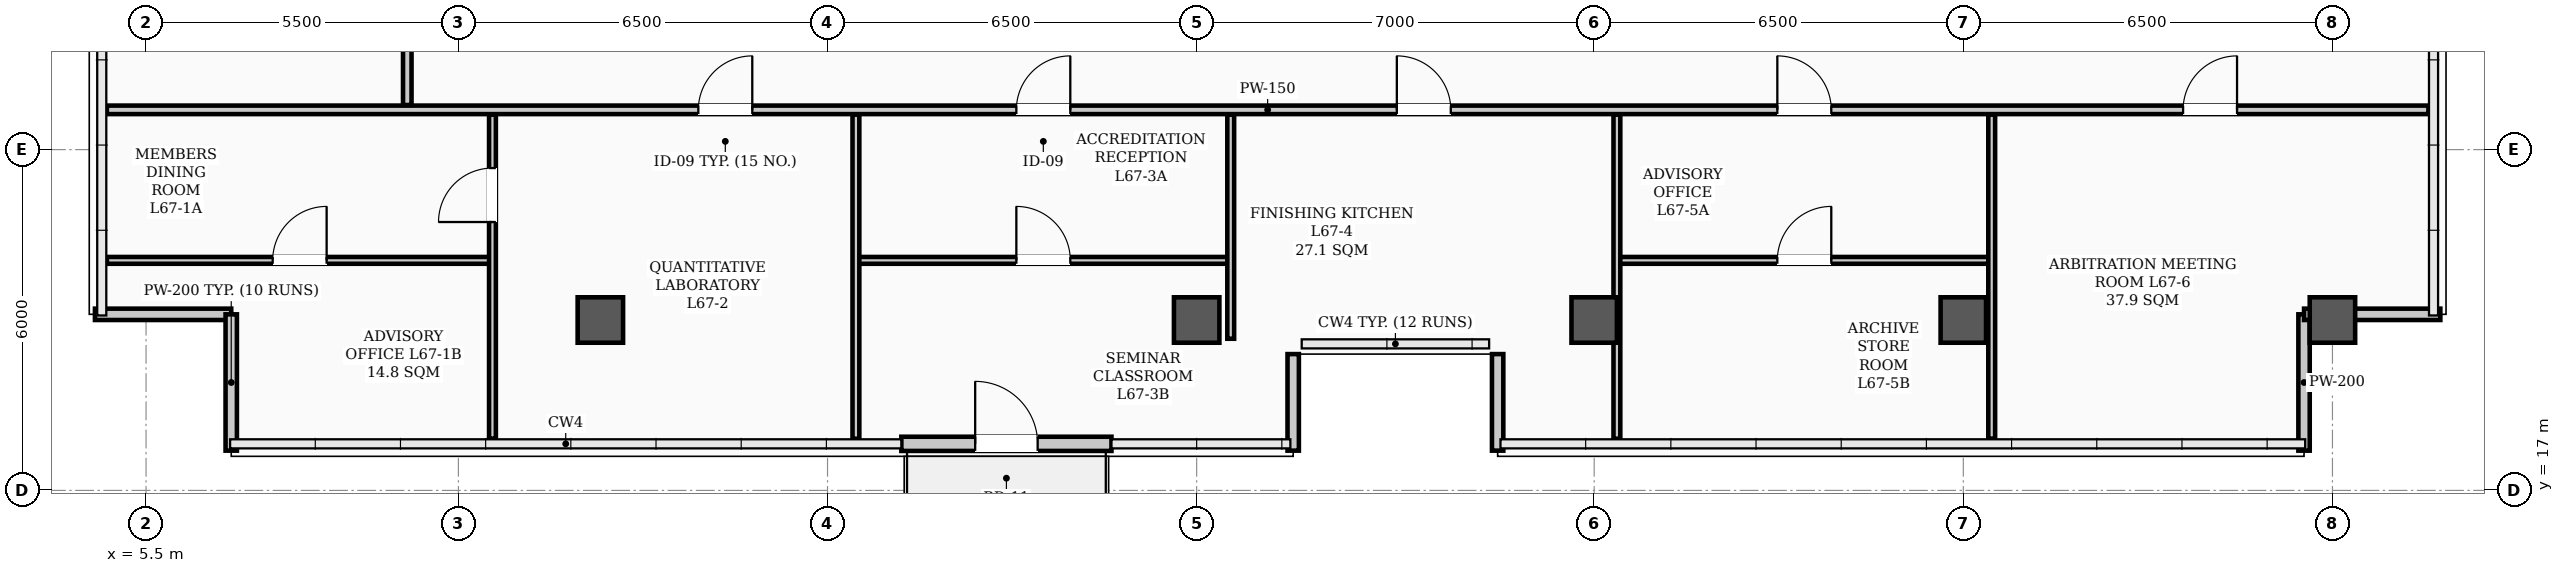
"""IFC4 building model, lengths in metres.
Left out: names, types, materials, properties, quantities, classifications, styles, units other than length and angle.
Written with IfcOpenShell. Run it as: python <this file> out.ifc"""

import sys

from ifc_helpers import new_model, si_unit, direction, frame, frame_2d, origin, origin_2d, place, context, subcontext, project, spatial, rectangle, hollow_rectangle, extrude, element, fill, save


model = new_model("IFC4")
c1 = context("Model", 3, precision=1e-05, world=origin(), true_north=direction((0.0, 1.0)))
c2 = subcontext(c1, "Body", "Model", "MODEL_VIEW")
j1 = project(units=[si_unit("LENGTHUNIT", "METRE"), si_unit("PLANEANGLEUNIT", "RADIAN")], contexts=[c1])
p1 = place(None, origin())
s1 = spatial("IfcSite", under=j1, at=p1, CompositionType="ELEMENT")
p2 = place(p1, origin())
s2 = spatial("IfcBuilding", under=s1, at=p2, CompositionType="ELEMENT")
p3 = place(p2, frame((0.0, 0.0, 269.6)))
s3 = spatial("IfcBuildingStorey", under=s2, at=p3, CompositionType="ELEMENT", Elevation=269.6)
for number, where, z_axis, x_axis in (
    (1, (13.5, 20.0, 0.0), (0.0, 0.0, 1.0), (1.0, 0.0, 0.0)),
    (2, (24.0, 20.0, 0.0), (0.0, 0.0, 1.0), (1.0, 0.0, 0.0)),
    (3, (31.0, 20.0, 0.0), (0.0, 0.0, 1.0), (1.0, 0.0, 0.0)),
    (4, (37.5, 20.0, 0.0), (0.0, 0.0, 1.0), (1.0, 0.0, 0.0)),
    (5, (44.0, 20.0, 0.0), (0.0, 0.0, 1.0), (1.0, 0.0, 0.0)),
):
    element("IfcColumn", number, at=place(p3, frame(where, z_axis=z_axis, x_axis=x_axis)), inside=s3, PredefinedType="COLUMN", context=c2, shape_type="SweptSolid", body=[
        extrude(hollow_rectangle(XDim=0.8, YDim=0.8, WallThickness=0.032, InnerFilletRadius=0.016, OuterFilletRadius=0.048, at=origin_2d()), origin(), (0.0, 0.0, 1.0), 3.9),
    ])
p4 = place(p3, frame((4.6, 20.1, 0.0), z_axis=(0.0, 0.0, 1.0), x_axis=(1.0, 0.0, 0.0)))
e6 = element("IfcWall", 6, at=p4, inside=s3, PredefinedType="PARAPET", context=c2, shape_type="SweptSolid", body=[
    extrude(rectangle(XDim=2.4, YDim=0.2, at=frame_2d((1.2, 0.0))), origin(), (0.0, 0.0, 1.0), 1.2),
])
for number, where, z_axis, x_axis in (
    (7, (7.0, 20.1, 0.0), (0.0, 0.0, 1.0), (0.0, -1.0, 0.0)),
    (8, (43.5, 17.7, 0.0), (0.0, 0.0, 1.0), (0.0, 1.0, 0.0)),
):
    element("IfcWall", number, at=place(p3, frame(where, z_axis=z_axis, x_axis=x_axis)), inside=s3, PredefinedType="PARAPET", context=c2, shape_type="SweptSolid", body=[
        extrude(rectangle(XDim=2.4, YDim=0.2, at=frame_2d((1.2, 0.0))), origin(), (0.0, 0.0, 1.0), 1.2),
    ])
p5 = place(p3, frame((43.5, 20.1, 0.0), z_axis=(0.0, 0.0, 1.0), x_axis=(1.0, 0.0, 0.0)))
e9 = element("IfcWall", 9, at=p5, inside=s3, PredefinedType="PARAPET", context=c2, shape_type="SweptSolid", body=[
    extrude(rectangle(XDim=2.4, YDim=0.2, at=frame_2d((1.2, 0.0))), origin(), (0.0, 0.0, 1.0), 1.2),
])
for number, where, z_axis, x_axis in (
    (10, (25.7, 17.7, 0.0), (0.0, 0.0, 1.0), (0.0, 1.0, 0.0)),
    (11, (29.3, 19.4, 0.0), (0.0, 0.0, 1.0), (0.0, -1.0, 0.0)),
):
    element("IfcWall", number, at=place(p3, frame(where, z_axis=z_axis, x_axis=x_axis)), inside=s3, PredefinedType="PARAPET", context=c2, shape_type="SweptSolid", body=[
        extrude(rectangle(XDim=1.7, YDim=0.2, at=frame_2d((0.85, 0.0))), origin(), (0.0, 0.0, 1.0), 1.2),
    ])
p6 = place(p3, frame((18.8, 17.82, 0.0), z_axis=(0.0, 0.0, 1.0), x_axis=(1.0, 0.0, 0.0)))
e12 = element("IfcWall", 12, at=p6, inside=s3, PredefinedType="STANDARD", context=c2, shape_type="SweptSolid", body=[
    extrude(rectangle(XDim=3.7, YDim=0.25, at=frame_2d((1.85, 0.0))), origin(), (0.0, 0.0, 1.0), 3.18),
])
p7 = place(p6, frame((1.3, 0.0, 0.0)))
e13 = element("IfcOpeningElement", 13, at=p7, cuts=e12, PredefinedType="OPENING", context=c2, shape_type="SweptSolid", body=[
    extrude(rectangle(XDim=1.1, YDim=2.2, at=frame_2d((0.55, 1.1))), frame((0.0, 0.135, 0.0), z_axis=(0.0, -1.0, 0.0), x_axis=(1.0, 0.0, 0.0)), (0.0, 0.0, 1.0), 0.27),
])
p8 = place(p3, frame((4.81, 23.7, 0.0), z_axis=(0.0, 0.0, 1.0), x_axis=(1.0, 0.0, 0.0)))
e14 = element("IfcWall", 14, at=p8, inside=s3, PredefinedType="PARTITIONING", context=c2, shape_type="SweptSolid", body=[
    extrude(rectangle(XDim=40.88, YDim=0.15, at=frame_2d((20.44, 0.0))), origin(), (0.0, 0.0, 1.0), 3.2),
])
p9 = place(p8, frame((10.415, 0.0, 0.0)))
e15 = element("IfcOpeningElement", 15, at=p9, cuts=e14, PredefinedType="OPENING", context=c2, shape_type="SweptSolid", body=[
    extrude(rectangle(XDim=0.95, YDim=2.08, at=frame_2d((0.475, 1.04))), frame((0.0, 0.085, 0.0), z_axis=(0.0, -1.0, 0.0), x_axis=(1.0, 0.0, 0.0)), (0.0, 0.0, 1.0), 0.17),
])
p10 = place(p8, frame((16.015, 0.0, 0.0)))
e16 = element("IfcOpeningElement", 16, at=p10, cuts=e14, PredefinedType="OPENING", context=c2, shape_type="SweptSolid", body=[
    extrude(rectangle(XDim=0.95, YDim=2.08, at=frame_2d((0.475, 1.04))), frame((0.0, 0.085, 0.0), z_axis=(0.0, -1.0, 0.0), x_axis=(1.0, 0.0, 0.0)), (0.0, 0.0, 1.0), 0.17),
])
p11 = place(p8, frame((22.715, 0.0, 0.0)))
e17 = element("IfcOpeningElement", 17, at=p11, cuts=e14, PredefinedType="OPENING", context=c2, shape_type="SweptSolid", body=[
    extrude(rectangle(XDim=0.95, YDim=2.08, at=frame_2d((0.475, 1.04))), frame((0.0, 0.085, 0.0), z_axis=(0.0, -1.0, 0.0), x_axis=(1.0, 0.0, 0.0)), (0.0, 0.0, 1.0), 0.17),
])
p12 = place(p8, frame((29.415, 0.0, 0.0)))
e18 = element("IfcOpeningElement", 18, at=p12, cuts=e14, PredefinedType="OPENING", context=c2, shape_type="SweptSolid", body=[
    extrude(rectangle(XDim=0.95, YDim=2.08, at=frame_2d((0.475, 1.04))), frame((0.0, 0.085, 0.0), z_axis=(0.0, -1.0, 0.0), x_axis=(1.0, 0.0, 0.0)), (0.0, 0.0, 1.0), 0.17),
])
p13 = place(p8, frame((36.56, 0.0, 0.0)))
e19 = element("IfcOpeningElement", 19, at=p13, cuts=e14, PredefinedType="OPENING", context=c2, shape_type="SweptSolid", body=[
    extrude(rectangle(XDim=0.95, YDim=2.08, at=frame_2d((0.475, 1.04))), frame((0.0, 0.085, 0.0), z_axis=(0.0, -1.0, 0.0), x_axis=(1.0, 0.0, 0.0)), (0.0, 0.0, 1.0), 0.17),
])
p14 = place(p3, frame((4.81, 21.05, 0.0), z_axis=(0.0, 0.0, 1.0), x_axis=(1.0, 0.0, 0.0)))
e20 = element("IfcWall", 20, at=p14, inside=s3, PredefinedType="PARTITIONING", context=c2, shape_type="SweptSolid", body=[
    extrude(rectangle(XDim=6.79, YDim=0.12, at=frame_2d((3.395, 0.0))), origin(), (0.0, 0.0, 1.0), 3.72),
])
p15 = place(p14, frame((2.92, 0.0, 0.0)))
e21 = element("IfcOpeningElement", 21, at=p15, cuts=e20, PredefinedType="OPENING", context=c2, shape_type="SweptSolid", body=[
    extrude(rectangle(XDim=0.95, YDim=2.08, at=frame_2d((0.475, 1.04))), frame((0.0, 0.07, 0.0), z_axis=(0.0, -1.0, 0.0), x_axis=(1.0, 0.0, 0.0)), (0.0, 0.0, 1.0), 0.14),
])
p16 = place(p3, frame((18.0, 21.05, 0.0), z_axis=(0.0, 0.0, 1.0), x_axis=(1.0, 0.0, 0.0)))
e22 = element("IfcWall", 22, at=p16, inside=s3, PredefinedType="PARTITIONING", context=c2, shape_type="SweptSolid", body=[
    extrude(rectangle(XDim=6.6, YDim=0.12, at=frame_2d((3.3, 0.0))), origin(), (0.0, 0.0, 1.0), 3.2),
])
p17 = place(p16, frame((2.825, 0.0, 0.0)))
e23 = element("IfcOpeningElement", 23, at=p17, cuts=e22, PredefinedType="OPENING", context=c2, shape_type="SweptSolid", body=[
    extrude(rectangle(XDim=0.95, YDim=2.08, at=frame_2d((0.475, 1.04))), frame((0.0, 0.07, 0.0), z_axis=(0.0, -1.0, 0.0), x_axis=(1.0, 0.0, 0.0)), (0.0, 0.0, 1.0), 0.14),
])
p18 = place(p3, frame((31.4, 21.05, 0.0), z_axis=(0.0, 0.0, 1.0), x_axis=(1.0, 0.0, 0.0)))
e24 = element("IfcWall", 24, at=p18, inside=s3, PredefinedType="PARTITIONING", context=c2, shape_type="SweptSolid", body=[
    extrude(rectangle(XDim=6.6, YDim=0.12, at=frame_2d((3.3, 0.0))), origin(), (0.0, 0.0, 1.0), 3.2),
])
p19 = place(p18, frame((2.825, 0.0, 0.0)))
e25 = element("IfcOpeningElement", 25, at=p19, cuts=e24, PredefinedType="OPENING", context=c2, shape_type="SweptSolid", body=[
    extrude(rectangle(XDim=0.95, YDim=2.08, at=frame_2d((0.475, 1.04))), frame((0.0, 0.07, 0.0), z_axis=(0.0, -1.0, 0.0), x_axis=(1.0, 0.0, 0.0)), (0.0, 0.0, 1.0), 0.14),
])
p20 = place(p3, frame((10.1, 23.785, 0.0), z_axis=(0.0, 0.0, 1.0), x_axis=(0.0, 1.0, 0.0)))
e26 = element("IfcWall", 26, at=p20, inside=s3, PredefinedType="PARTITIONING", context=c2, shape_type="SweptSolid", body=[
    extrude(rectangle(XDim=17.88, YDim=0.15, at=frame_2d((8.94, 0.0))), origin(), (0.0, 0.0, 1.0), 3.1),
])
p21 = place(p20, frame((8.465, 0.0, 0.0)))
e27 = element("IfcOpeningElement", 27, at=p21, cuts=e26, PredefinedType="OPENING", context=c2, shape_type="SweptSolid", body=[
    extrude(rectangle(XDim=0.95, YDim=2.08, at=frame_2d((0.475, 1.04))), frame((0.0, 0.085, 0.0), z_axis=(0.0, -1.0, 0.0), x_axis=(1.0, 0.0, 0.0)), (0.0, 0.0, 1.0), 0.17),
])
p22 = place(p3, frame((11.6, 17.91, 0.0), z_axis=(0.0, 0.0, 1.0), x_axis=(0.0, 1.0, 0.0)))
e28 = element("IfcWall", 28, at=p22, inside=s3, PredefinedType="PARTITIONING", context=c2, shape_type="SweptSolid", body=[
    extrude(rectangle(XDim=5.705, YDim=0.12, at=frame_2d((2.853, 0.0))), origin(), (0.0, 0.0, 1.0), 3.72),
])
p23 = place(p22, frame((3.815, 0.0, 0.0)))
e29 = element("IfcOpeningElement", 29, at=p23, cuts=e28, PredefinedType="OPENING", context=c2, shape_type="SweptSolid", body=[
    extrude(rectangle(XDim=0.95, YDim=2.08, at=frame_2d((0.475, 1.04))), frame((0.0, 0.07, 0.0), z_axis=(0.0, -1.0, 0.0), x_axis=(1.0, 0.0, 0.0)), (0.0, 0.0, 1.0), 0.14),
])
p24 = place(p3, frame((18.0, 17.91, 0.0), z_axis=(0.0, 0.0, 1.0), x_axis=(0.0, 1.0, 0.0)))
e30 = element("IfcWall", 30, at=p24, inside=s3, PredefinedType="PARTITIONING", context=c2, shape_type="SweptSolid", body=[
    extrude(rectangle(XDim=5.705, YDim=0.12, at=frame_2d((2.853, 0.0))), origin(), (0.0, 0.0, 1.0), 3.1),
])
p25 = place(p3, frame((24.6, 19.67, 0.0), z_axis=(0.0, 0.0, 1.0), x_axis=(0.0, 1.0, 0.0)))
e31 = element("IfcWall", 31, at=p25, inside=s3, PredefinedType="PARTITIONING", context=c2, shape_type="SweptSolid", body=[
    extrude(rectangle(XDim=3.945, YDim=0.12, at=frame_2d((1.973, 0.0))), origin(), (0.0, 0.0, 1.0), 3.1),
])
for number, where, z_axis, x_axis in (
    (32, (31.4, 17.91, 0.0), (0.0, 0.0, 1.0), (0.0, 1.0, 0.0)),
    (33, (38.0, 17.91, 0.0), (0.0, 0.0, 1.0), (0.0, 1.0, 0.0)),
):
    element("IfcWall", number, at=place(p3, frame(where, z_axis=z_axis, x_axis=x_axis)), inside=s3, PredefinedType="PARTITIONING", context=c2, shape_type="SweptSolid", body=[
        extrude(rectangle(XDim=5.705, YDim=0.12, at=frame_2d((2.853, 0.0))), origin(), (0.0, 0.0, 1.0), 3.1),
    ])
p26 = place(p7, origin())
e34 = element("IfcDoor", 34, at=p26, inside=s3, OperationType="SINGLE_SWING_LEFT", PredefinedType="DOOR", context=c2, shape_type="SweptSolid", body=[
    extrude(rectangle(XDim=1.1, YDim=2.2, at=frame_2d((0.55, 1.1))), frame((0.0, 0.025, 0.0), z_axis=(0.0, -1.0, 0.0), x_axis=(1.0, 0.0, 0.0)), (0.0, 0.0, 1.0), 0.05),
])
fill(e13, e34)
p27 = place(p15, origin())
e35 = element("IfcDoor", 35, at=p27, inside=s3, OperationType="SINGLE_SWING_RIGHT", PredefinedType="DOOR", context=c2, shape_type="SweptSolid", body=[
    extrude(rectangle(XDim=0.95, YDim=2.08, at=frame_2d((0.475, 1.04))), frame((0.0, 0.025, 0.0), z_axis=(0.0, -1.0, 0.0), x_axis=(1.0, 0.0, 0.0)), (0.0, 0.0, 1.0), 0.05),
])
fill(e21, e35)
p28 = place(p23, origin())
e36 = element("IfcDoor", 36, at=p28, inside=s3, OperationType="SINGLE_SWING_LEFT", PredefinedType="DOOR", context=c2, shape_type="SweptSolid", body=[
    extrude(rectangle(XDim=0.95, YDim=2.08, at=frame_2d((0.475, 1.04))), frame((0.0, 0.025, 0.0), z_axis=(0.0, -1.0, 0.0), x_axis=(1.0, 0.0, 0.0)), (0.0, 0.0, 1.0), 0.05),
])
fill(e29, e36)
p29 = place(p9, origin())
e37 = element("IfcDoor", 37, at=p29, inside=s3, OperationType="SINGLE_SWING_RIGHT", PredefinedType="DOOR", context=c2, shape_type="SweptSolid", body=[
    extrude(rectangle(XDim=0.95, YDim=2.08, at=frame_2d((0.475, 1.04))), frame((0.0, 0.025, 0.0), z_axis=(0.0, -1.0, 0.0), x_axis=(1.0, 0.0, 0.0)), (0.0, 0.0, 1.0), 0.05),
])
fill(e15, e37)
p30 = place(p17, origin())
e38 = element("IfcDoor", 38, at=p30, inside=s3, OperationType="SINGLE_SWING_LEFT", PredefinedType="DOOR", context=c2, shape_type="SweptSolid", body=[
    extrude(rectangle(XDim=0.95, YDim=2.08, at=frame_2d((0.475, 1.04))), frame((0.0, 0.025, 0.0), z_axis=(0.0, -1.0, 0.0), x_axis=(1.0, 0.0, 0.0)), (0.0, 0.0, 1.0), 0.05),
])
fill(e23, e38)
p31 = place(p10, origin())
e39 = element("IfcDoor", 39, at=p31, inside=s3, OperationType="SINGLE_SWING_RIGHT", PredefinedType="DOOR", context=c2, shape_type="SweptSolid", body=[
    extrude(rectangle(XDim=0.95, YDim=2.08, at=frame_2d((0.475, 1.04))), frame((0.0, 0.025, 0.0), z_axis=(0.0, -1.0, 0.0), x_axis=(1.0, 0.0, 0.0)), (0.0, 0.0, 1.0), 0.05),
])
fill(e16, e39)
p32 = place(p11, origin())
e40 = element("IfcDoor", 40, at=p32, inside=s3, OperationType="SINGLE_SWING_LEFT", PredefinedType="DOOR", context=c2, shape_type="SweptSolid", body=[
    extrude(rectangle(XDim=0.95, YDim=2.08, at=frame_2d((0.475, 1.04))), frame((0.0, 0.025, 0.0), z_axis=(0.0, -1.0, 0.0), x_axis=(1.0, 0.0, 0.0)), (0.0, 0.0, 1.0), 0.05),
])
fill(e17, e40)
p33 = place(p19, origin())
e41 = element("IfcDoor", 41, at=p33, inside=s3, OperationType="SINGLE_SWING_RIGHT", PredefinedType="DOOR", context=c2, shape_type="SweptSolid", body=[
    extrude(rectangle(XDim=0.95, YDim=2.08, at=frame_2d((0.475, 1.04))), frame((0.0, 0.025, 0.0), z_axis=(0.0, -1.0, 0.0), x_axis=(1.0, 0.0, 0.0)), (0.0, 0.0, 1.0), 0.05),
])
fill(e25, e41)
p34 = place(p12, origin())
e42 = element("IfcDoor", 42, at=p34, inside=s3, OperationType="SINGLE_SWING_LEFT", PredefinedType="DOOR", context=c2, shape_type="SweptSolid", body=[
    extrude(rectangle(XDim=0.95, YDim=2.08, at=frame_2d((0.475, 1.04))), frame((0.0, 0.025, 0.0), z_axis=(0.0, -1.0, 0.0), x_axis=(1.0, 0.0, 0.0)), (0.0, 0.0, 1.0), 0.05),
])
fill(e18, e42)
p35 = place(p13, origin())
e43 = element("IfcDoor", 43, at=p35, inside=s3, OperationType="SINGLE_SWING_RIGHT", PredefinedType="DOOR", context=c2, shape_type="SweptSolid", body=[
    extrude(rectangle(XDim=0.95, YDim=2.08, at=frame_2d((0.475, 1.04))), frame((0.0, 0.025, 0.0), z_axis=(0.0, -1.0, 0.0), x_axis=(1.0, 0.0, 0.0)), (0.0, 0.0, 1.0), 0.05),
])
fill(e19, e43)
save(model, sys.argv[1])
